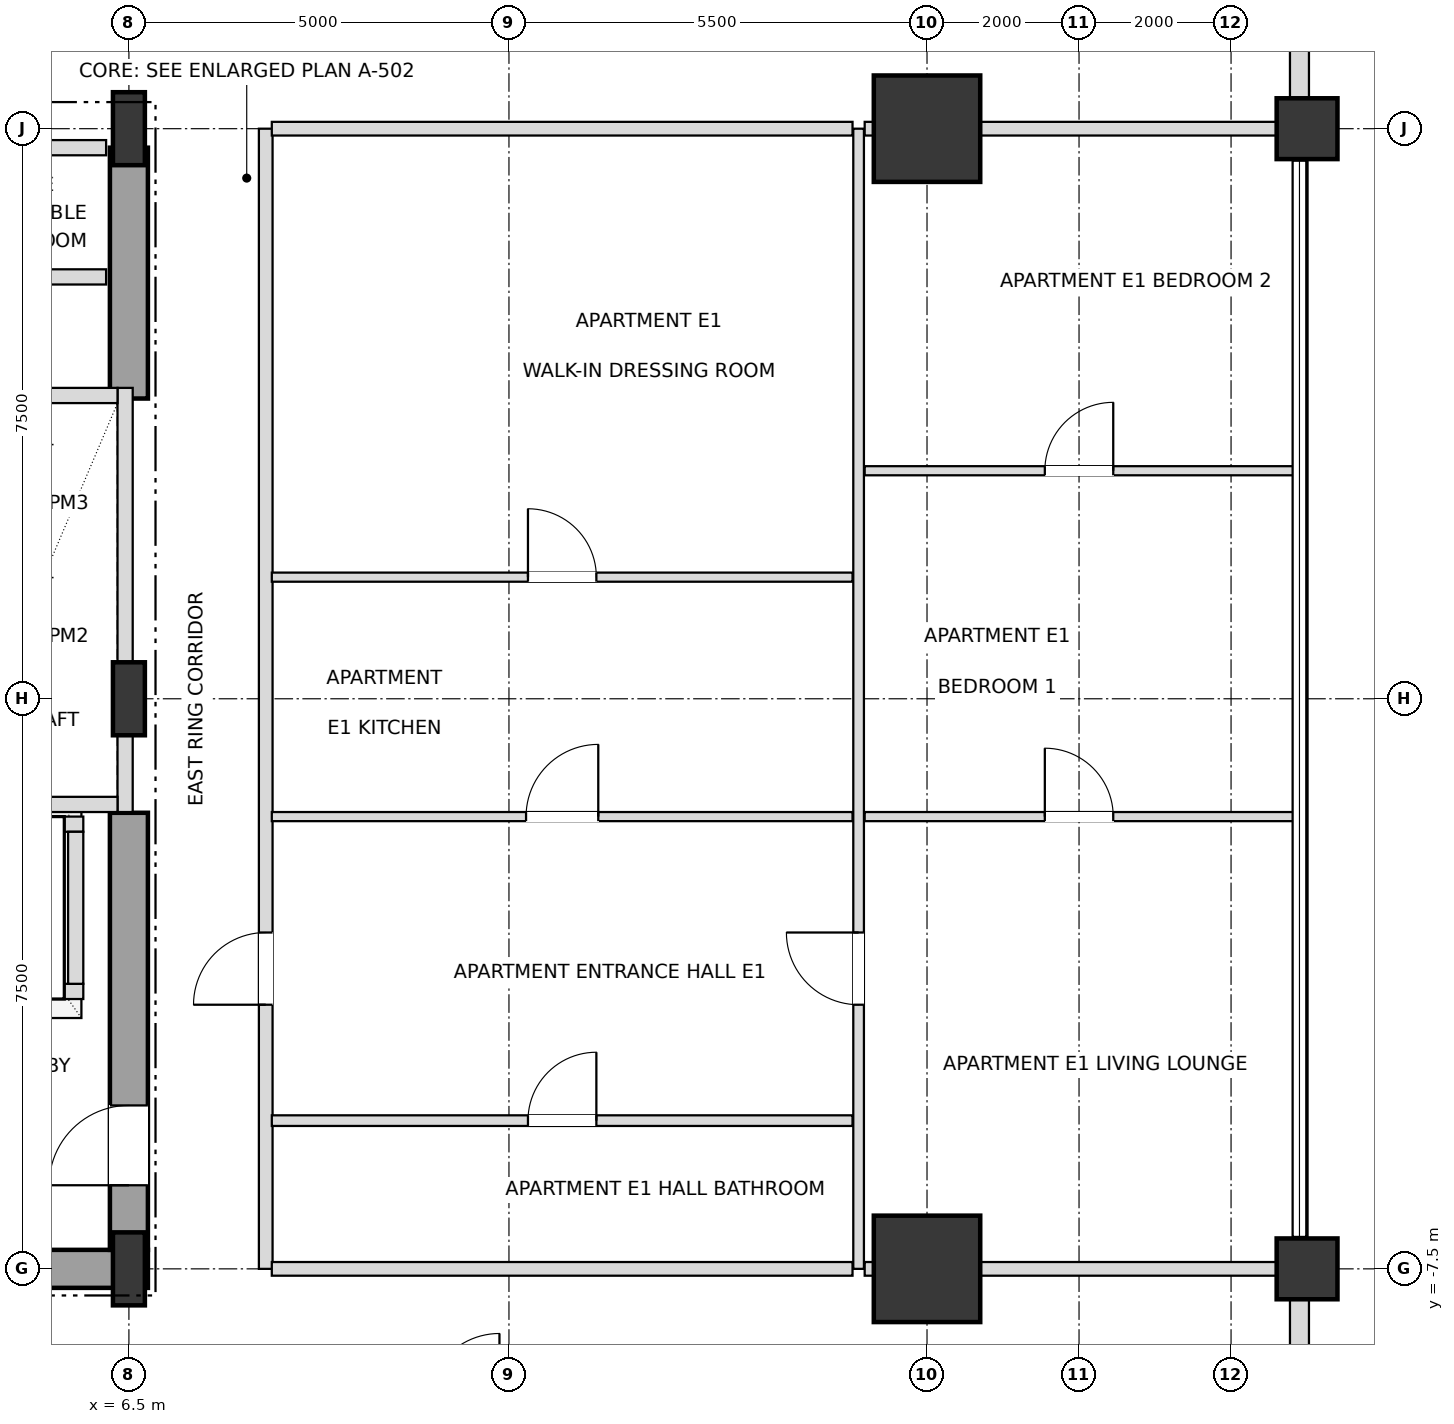
"""IFC4 building model, lengths in metres.
Left out: names, types, materials, properties, quantities, classifications, styles, units other than length and angle.
Written with IfcOpenShell. Run it as: python <this file> out.ifc"""

import sys

from ifc_helpers import new_model, si_unit, direction, frame, frame_2d, origin, origin_2d, place, context, subcontext, project, spatial, rectangle, i_section, extrude, element, fill, save


model = new_model("IFC4")
c1 = context("Model", 3, precision=1e-05, world=origin(), true_north=direction((0.0, 1.0)))
c2 = subcontext(c1, "Body", "Model", "MODEL_VIEW")
j1 = project(units=[si_unit("LENGTHUNIT", "METRE"), si_unit("PLANEANGLEUNIT", "RADIAN")], contexts=[c1])
p1 = place(None, origin())
s1 = spatial("IfcSite", under=j1, at=p1, CompositionType="ELEMENT")
p2 = place(p1, origin())
s2 = spatial("IfcBuilding", under=s1, at=p2, CompositionType="ELEMENT")
p3 = place(p2, frame((0.0, 0.0, 57.6)))
s3 = spatial("IfcBuildingStorey", under=s2, at=p3, CompositionType="ELEMENT", Elevation=57.6)
for number, where, z_axis, x_axis in (
    (1, (6.5, -7.5, 0.0), (0.0, 0.0, 1.0), (1.0, 0.0, 0.0)),
    (2, (6.5, 0.0, 0.0), (0.0, 0.0, 1.0), (1.0, 0.0, 0.0)),
    (3, (6.5, 7.5, 0.0), (0.0, 0.0, 1.0), (1.0, 0.0, 0.0)),
):
    element("IfcColumn", number, at=place(p3, frame(where, z_axis=z_axis, x_axis=x_axis)), inside=s3, PredefinedType="COLUMN", context=c2, shape_type="SweptSolid", body=[
        extrude(i_section(OverallWidth=0.42, OverallDepth=0.96, WebThickness=0.022, FlangeThickness=0.034, at=origin_2d()), origin(), (0.0, 0.0, 1.0), 3.6),
    ])
for number, where, z_axis, x_axis in (
    (4, (17.0, -7.5, 0.0), (0.0, 0.0, 1.0), (1.0, 0.0, 0.0)),
    (5, (17.0, 7.5, 0.0), (0.0, 0.0, 1.0), (1.0, 0.0, 0.0)),
):
    element("IfcColumn", number, at=place(p3, frame(where, z_axis=z_axis, x_axis=x_axis)), inside=s3, PredefinedType="USERDEFINED", context=c2, shape_type="SweptSolid", body=[
        extrude(rectangle(XDim=1.4, YDim=1.4, at=origin_2d()), origin(), (0.0, 0.0, 1.0), 3.6),
    ])
for number, where, z_axis, x_axis in (
    (6, (22.0, -7.5, 0.0), (0.0, 0.0, 1.0), (1.0, 0.0, 0.0)),
    (7, (22.0, 7.5, 0.0), (0.0, 0.0, 1.0), (1.0, 0.0, 0.0)),
):
    element("IfcColumn", number, at=place(p3, frame(where, z_axis=z_axis, x_axis=x_axis)), inside=s3, PredefinedType="COLUMN", context=c2, shape_type="SweptSolid", body=[
        extrude(rectangle(XDim=0.8, YDim=0.8, at=origin_2d()), origin(), (0.0, 0.0, 1.0), 3.6),
    ])
p4 = place(p3, frame((21.9, -12.605, 0.0), z_axis=(0.0, 0.0, 1.0), x_axis=(0.0, 1.0, 0.0)))
e8 = element("IfcWall", 8, at=p4, inside=s3, PredefinedType="SOLIDWALL", context=c2, shape_type="SweptSolid", body=[
    extrude(rectangle(XDim=4.71, YDim=0.25, at=frame_2d((2.355, 0.0))), origin(), (0.0, 0.0, 1.0), 2.736),
])
p5 = place(p4, frame((1.455, 0.0, 0.72)))
e9 = element("IfcOpeningElement", 9, at=p5, cuts=e8, PredefinedType="OPENING", context=c2, shape_type="SweptSolid", body=[
    extrude(rectangle(XDim=1.8, YDim=1.68, at=frame_2d((0.9, 0.84))), frame((0.0, 0.135, 0.0), z_axis=(0.0, -1.0, 0.0), x_axis=(1.0, 0.0, 0.0)), (0.0, 0.0, 1.0), 0.27),
])
p6 = place(p3, frame((21.9, 7.895, 0.0), z_axis=(0.0, 0.0, 1.0), x_axis=(0.0, 1.0, 0.0)))
e10 = element("IfcWall", 10, at=p6, inside=s3, PredefinedType="SOLIDWALL", context=c2, shape_type="SweptSolid", body=[
    extrude(rectangle(XDim=4.71, YDim=0.25, at=frame_2d((2.355, 0.0))), origin(), (0.0, 0.0, 1.0), 2.736),
])
p7 = place(p6, frame((1.455, 0.0, 0.72)))
e11 = element("IfcOpeningElement", 11, at=p7, cuts=e10, PredefinedType="OPENING", context=c2, shape_type="SweptSolid", body=[
    extrude(rectangle(XDim=1.8, YDim=1.68, at=frame_2d((0.9, 0.84))), frame((0.0, 0.135, 0.0), z_axis=(0.0, -1.0, 0.0), x_axis=(1.0, 0.0, 0.0)), (0.0, 0.0, 1.0), 0.27),
])
p8 = place(p3, frame((0.0, -7.5, 0.0), z_axis=(0.0, 0.0, 1.0), x_axis=(1.0, 0.0, 0.0)))
e12 = element("IfcWall", 12, at=p8, inside=s3, PredefinedType="SHEAR", context=c2, shape_type="SweptSolid", body=[
    extrude(rectangle(XDim=6.75, YDim=0.5, at=frame_2d((3.375, 0.0))), origin(), (0.0, 0.0, 1.0), 3.38),
])
p9 = place(p3, frame((6.5, -7.25, 0.0), z_axis=(0.0, 0.0, 1.0), x_axis=(0.0, 1.0, 0.0)))
e13 = element("IfcWall", 13, at=p9, inside=s3, PredefinedType="SHEAR", context=c2, shape_type="SweptSolid", body=[
    extrude(rectangle(XDim=5.75, YDim=0.5, at=frame_2d((2.875, 0.0))), origin(), (0.0, 0.0, 1.0), 3.38),
])
p10 = place(p9, frame((0.85, 0.0, 0.0)))
e14 = element("IfcOpeningElement", 14, at=p10, cuts=e13, PredefinedType="OPENING", context=c2, shape_type="SweptSolid", body=[
    extrude(rectangle(XDim=1.05, YDim=2.15, at=frame_2d((0.525, 1.075))), frame((0.0, 0.26, 0.0), z_axis=(0.0, -1.0, 0.0), x_axis=(1.0, 0.0, 0.0)), (0.0, 0.0, 1.0), 0.52),
])
p11 = place(p3, frame((6.5, 3.95, 0.0), z_axis=(0.0, 0.0, 1.0), x_axis=(0.0, 1.0, 0.0)))
e15 = element("IfcWall", 15, at=p11, inside=s3, PredefinedType="SHEAR", context=c2, shape_type="SweptSolid", body=[
    extrude(rectangle(XDim=3.3, YDim=0.5, at=frame_2d((1.65, 0.0))), origin(), (0.0, 0.0, 1.0), 3.38),
])
p12 = place(p3, frame((6.45, -1.49, 0.0), z_axis=(0.0, 0.0, 1.0), x_axis=(0.0, 1.0, 0.0)))
e16 = element("IfcWall", 16, at=p12, inside=s3, PredefinedType="SOLIDWALL", context=c2, shape_type="SweptSolid", body=[
    extrude(rectangle(XDim=5.58, YDim=0.2, at=frame_2d((2.79, 0.0))), origin(), (0.0, 0.0, 1.0), 2.816),
])
for number, where, z_axis, x_axis in (
    (17, (4.15, -1.39, 0.0), (0.0, 0.0, 1.0), (1.0, 0.0, 0.0)),
    (18, (4.15, 3.99, 0.0), (0.0, 0.0, 1.0), (1.0, 0.0, 0.0)),
):
    element("IfcWall", number, at=place(p3, frame(where, z_axis=z_axis, x_axis=x_axis)), inside=s3, PredefinedType="SOLIDWALL", context=c2, shape_type="SweptSolid", body=[
        extrude(rectangle(XDim=2.2, YDim=0.2, at=frame_2d((1.1, 0.0))), origin(), (0.0, 0.0, 1.0), 3.38),
    ])
p13 = place(p3, frame((1.8, -3.85, 0.0), z_axis=(0.0, 0.0, 1.0), x_axis=(1.0, 0.0, 0.0)))
e19 = element("IfcWall", 19, at=p13, inside=s3, PredefinedType="SOLIDWALL", context=c2, shape_type="SweptSolid", body=[
    extrude(rectangle(XDim=4.1, YDim=0.2, at=frame_2d((2.05, 0.0))), origin(), (0.0, 0.0, 1.0), 3.38),
])
p14 = place(p13, frame((0.45, 0.0, 0.0)))
e20 = element("IfcOpeningElement", 20, at=p14, cuts=e19, PredefinedType="OPENING", context=c2, shape_type="SweptSolid", body=[
    extrude(rectangle(XDim=1.2, YDim=2.2, at=frame_2d((0.6, 1.1))), frame((0.0, 0.11, 0.0), z_axis=(0.0, -1.0, 0.0), x_axis=(1.0, 0.0, 0.0)), (0.0, 0.0, 1.0), 0.22),
])
p15 = place(p13, frame((2.45, 0.0, 0.0)))
e21 = element("IfcOpeningElement", 21, at=p15, cuts=e19, PredefinedType="OPENING", context=c2, shape_type="SweptSolid", body=[
    extrude(rectangle(XDim=1.2, YDim=2.2, at=frame_2d((0.6, 1.1))), frame((0.0, 0.11, 0.0), z_axis=(0.0, -1.0, 0.0), x_axis=(1.0, 0.0, 0.0)), (0.0, 0.0, 1.0), 0.22),
])
p16 = place(p3, frame((1.8, -1.65, 0.0), z_axis=(0.0, 0.0, 1.0), x_axis=(1.0, 0.0, 0.0)))
e22 = element("IfcWall", 22, at=p16, inside=s3, PredefinedType="SOLIDWALL", context=c2, shape_type="SweptSolid", body=[
    extrude(rectangle(XDim=4.1, YDim=0.2, at=frame_2d((2.05, 0.0))), origin(), (0.0, 0.0, 1.0), 3.38),
])
p17 = place(p3, frame((5.8, -3.75, 0.0), z_axis=(0.0, 0.0, 1.0), x_axis=(0.0, 1.0, 0.0)))
e23 = element("IfcWall", 23, at=p17, inside=s3, PredefinedType="SOLIDWALL", context=c2, shape_type="SweptSolid", body=[
    extrude(rectangle(XDim=2.0, YDim=0.2, at=frame_2d((1.0, 0.0))), origin(), (0.0, 0.0, 1.0), 3.38),
])
p18 = place(p3, frame((8.3, -7.5, 0.0), z_axis=(0.0, 0.0, 1.0), x_axis=(0.0, 1.0, 0.0)))
e24 = element("IfcWall", 24, at=p18, inside=s3, PredefinedType="PARTITIONING", context=c2, shape_type="SweptSolid", body=[
    extrude(rectangle(XDim=15.0, YDim=0.18, at=frame_2d((7.5, 0.0))), origin(), (0.0, 0.0, 1.0), 3.38),
])
p19 = place(p18, frame((3.475, 0.0, 0.0)))
e25 = element("IfcOpeningElement", 25, at=p19, cuts=e24, PredefinedType="OPENING", context=c2, shape_type="SweptSolid", body=[
    extrude(rectangle(XDim=0.95, YDim=2.15, at=frame_2d((0.475, 1.075))), frame((0.0, 0.1, 0.0), z_axis=(0.0, -1.0, 0.0), x_axis=(1.0, 0.0, 0.0)), (0.0, 0.0, 1.0), 0.2),
])
p20 = place(p3, frame((16.1, -7.5, 0.0), z_axis=(0.0, 0.0, 1.0), x_axis=(0.0, 1.0, 0.0)))
e26 = element("IfcWall", 26, at=p20, inside=s3, PredefinedType="PARTITIONING", context=c2, shape_type="SweptSolid", body=[
    extrude(rectangle(XDim=15.0, YDim=0.14, at=frame_2d((7.5, 0.0))), origin(), (0.0, 0.0, 1.0), 3.38),
])
p21 = place(p20, frame((3.475, 0.0, 0.0)))
e27 = element("IfcOpeningElement", 27, at=p21, cuts=e26, PredefinedType="OPENING", context=c2, shape_type="SweptSolid", body=[
    extrude(rectangle(XDim=0.95, YDim=2.1, at=frame_2d((0.475, 1.05))), frame((0.0, 0.08, 0.0), z_axis=(0.0, -1.0, 0.0), x_axis=(1.0, 0.0, 0.0)), (0.0, 0.0, 1.0), 0.16),
])
p22 = place(p3, frame((8.38, -7.5, 0.0), z_axis=(0.0, 0.0, 1.0), x_axis=(1.0, 0.0, 0.0)))
e28 = element("IfcWall", 28, at=p22, inside=s3, PredefinedType="PARTITIONING", context=c2, shape_type="SweptSolid", body=[
    extrude(rectangle(XDim=7.64, YDim=0.18, at=frame_2d((3.82, 0.0))), origin(), (0.0, 0.0, 1.0), 2.816),
])
p23 = place(p3, frame((16.18, -7.5, 0.0), z_axis=(0.0, 0.0, 1.0), x_axis=(1.0, 0.0, 0.0)))
e29 = element("IfcWall", 29, at=p23, inside=s3, PredefinedType="PARTITIONING", context=c2, shape_type="SweptSolid", body=[
    extrude(rectangle(XDim=5.72, YDim=0.18, at=frame_2d((2.86, 0.0))), origin(), (0.0, 0.0, 1.0), 2.816),
])
p24 = place(p3, frame((8.38, -5.55, 0.0), z_axis=(0.0, 0.0, 1.0), x_axis=(1.0, 0.0, 0.0)))
e30 = element("IfcWall", 30, at=p24, inside=s3, PredefinedType="PARTITIONING", context=c2, shape_type="SweptSolid", body=[
    extrude(rectangle(XDim=7.64, YDim=0.14, at=frame_2d((3.82, 0.0))), origin(), (0.0, 0.0, 1.0), 2.948),
])
p25 = place(p24, frame((3.37, 0.0, 0.0)))
e31 = element("IfcOpeningElement", 31, at=p25, cuts=e30, PredefinedType="OPENING", context=c2, shape_type="SweptSolid", body=[
    extrude(rectangle(XDim=0.9, YDim=2.1, at=frame_2d((0.45, 1.05))), frame((0.0, 0.08, 0.0), z_axis=(0.0, -1.0, 0.0), x_axis=(1.0, 0.0, 0.0)), (0.0, 0.0, 1.0), 0.16),
])
p26 = place(p3, frame((8.38, -1.55, 0.0), z_axis=(0.0, 0.0, 1.0), x_axis=(1.0, 0.0, 0.0)))
e32 = element("IfcWall", 32, at=p26, inside=s3, PredefinedType="PARTITIONING", context=c2, shape_type="SweptSolid", body=[
    extrude(rectangle(XDim=7.64, YDim=0.12, at=frame_2d((3.82, 0.0))), origin(), (0.0, 0.0, 1.0), 2.948),
])
p27 = place(p26, frame((3.345, 0.0, 0.0)))
e33 = element("IfcOpeningElement", 33, at=p27, cuts=e32, PredefinedType="OPENING", context=c2, shape_type="SweptSolid", body=[
    extrude(rectangle(XDim=0.95, YDim=2.1, at=frame_2d((0.475, 1.05))), frame((0.0, 0.07, 0.0), z_axis=(0.0, -1.0, 0.0), x_axis=(1.0, 0.0, 0.0)), (0.0, 0.0, 1.0), 0.14),
])
p28 = place(p3, frame((16.18, -1.55, 0.0), z_axis=(0.0, 0.0, 1.0), x_axis=(1.0, 0.0, 0.0)))
e34 = element("IfcWall", 34, at=p28, inside=s3, PredefinedType="PARTITIONING", context=c2, shape_type="SweptSolid", body=[
    extrude(rectangle(XDim=5.64, YDim=0.12, at=frame_2d((2.82, 0.0))), origin(), (0.0, 0.0, 1.0), 2.816),
])
p29 = place(p28, frame((2.37, 0.0, 0.0)))
e35 = element("IfcOpeningElement", 35, at=p29, cuts=e34, PredefinedType="OPENING", context=c2, shape_type="SweptSolid", body=[
    extrude(rectangle(XDim=0.9, YDim=2.1, at=frame_2d((0.45, 1.05))), frame((0.0, 0.07, 0.0), z_axis=(0.0, -1.0, 0.0), x_axis=(1.0, 0.0, 0.0)), (0.0, 0.0, 1.0), 0.14),
])
p30 = place(p3, frame((8.38, 1.6, 0.0), z_axis=(0.0, 0.0, 1.0), x_axis=(1.0, 0.0, 0.0)))
e36 = element("IfcWall", 36, at=p30, inside=s3, PredefinedType="PARTITIONING", context=c2, shape_type="SweptSolid", body=[
    extrude(rectangle(XDim=7.64, YDim=0.12, at=frame_2d((3.82, 0.0))), origin(), (0.0, 0.0, 1.0), 2.948),
])
p31 = place(p30, frame((3.37, 0.0, 0.0)))
e37 = element("IfcOpeningElement", 37, at=p31, cuts=e36, PredefinedType="OPENING", context=c2, shape_type="SweptSolid", body=[
    extrude(rectangle(XDim=0.9, YDim=2.1, at=frame_2d((0.45, 1.05))), frame((0.0, 0.07, 0.0), z_axis=(0.0, -1.0, 0.0), x_axis=(1.0, 0.0, 0.0)), (0.0, 0.0, 1.0), 0.14),
])
p32 = place(p3, frame((16.18, 3.0, 0.0), z_axis=(0.0, 0.0, 1.0), x_axis=(1.0, 0.0, 0.0)))
e38 = element("IfcWall", 38, at=p32, inside=s3, PredefinedType="PARTITIONING", context=c2, shape_type="SweptSolid", body=[
    extrude(rectangle(XDim=5.64, YDim=0.12, at=frame_2d((2.82, 0.0))), origin(), (0.0, 0.0, 1.0), 2.816),
])
p33 = place(p32, frame((2.37, 0.0, 0.0)))
e39 = element("IfcOpeningElement", 39, at=p33, cuts=e38, PredefinedType="OPENING", context=c2, shape_type="SweptSolid", body=[
    extrude(rectangle(XDim=0.9, YDim=2.1, at=frame_2d((0.45, 1.05))), frame((0.0, 0.07, 0.0), z_axis=(0.0, -1.0, 0.0), x_axis=(1.0, 0.0, 0.0)), (0.0, 0.0, 1.0), 0.14),
])
for number, where, z_axis, x_axis in (
    (40, (4.13, 5.55, 0.0), (0.0, 0.0, 1.0), (1.0, 0.0, 0.0)),
    (41, (4.13, 7.25, 0.0), (0.0, 0.0, 1.0), (1.0, 0.0, 0.0)),
):
    element("IfcWall", number, at=place(p3, frame(where, z_axis=z_axis, x_axis=x_axis)), inside=s3, PredefinedType="SOLIDWALL", context=c2, shape_type="SweptSolid", body=[
        extrude(rectangle(XDim=2.07, YDim=0.2, at=frame_2d((1.035, 0.0))), origin(), (0.0, 0.0, 1.0), 3.38),
    ])
p34 = place(p3, frame((8.38, 7.5, 0.0), z_axis=(0.0, 0.0, 1.0), x_axis=(1.0, 0.0, 0.0)))
e42 = element("IfcWall", 42, at=p34, inside=s3, PredefinedType="PARTITIONING", context=c2, shape_type="SweptSolid", body=[
    extrude(rectangle(XDim=7.64, YDim=0.18, at=frame_2d((3.82, 0.0))), origin(), (0.0, 0.0, 1.0), 2.816),
])
p35 = place(p3, frame((16.18, 7.5, 0.0), z_axis=(0.0, 0.0, 1.0), x_axis=(1.0, 0.0, 0.0)))
e43 = element("IfcWall", 43, at=p35, inside=s3, PredefinedType="PARTITIONING", context=c2, shape_type="SweptSolid", body=[
    extrude(rectangle(XDim=5.72, YDim=0.18, at=frame_2d((2.86, 0.0))), origin(), (0.0, 0.0, 1.0), 2.816),
])
p36 = place(p10, origin())
e44 = element("IfcDoor", 44, at=p36, inside=s3, OperationType="SINGLE_SWING_LEFT", PredefinedType="DOOR", context=c2, shape_type="SweptSolid", body=[
    extrude(rectangle(XDim=1.05, YDim=2.15, at=frame_2d((0.525, 1.075))), frame((0.0, 0.025, 0.0), z_axis=(0.0, -1.0, 0.0), x_axis=(1.0, 0.0, 0.0)), (0.0, 0.0, 1.0), 0.05),
])
fill(e14, e44)
p37 = place(p25, origin())
e45 = element("IfcDoor", 45, at=p37, inside=s3, OperationType="SINGLE_SWING_RIGHT", PredefinedType="DOOR", context=c2, shape_type="SweptSolid", body=[
    extrude(rectangle(XDim=0.9, YDim=2.1, at=frame_2d((0.45, 1.05))), frame((0.0, 0.025, 0.0), z_axis=(0.0, -1.0, 0.0), x_axis=(1.0, 0.0, 0.0)), (0.0, 0.0, 1.0), 0.05),
])
fill(e31, e45)
p38 = place(p19, origin())
e46 = element("IfcDoor", 46, at=p38, inside=s3, OperationType="SINGLE_SWING_LEFT", PredefinedType="DOOR", context=c2, shape_type="SweptSolid", body=[
    extrude(rectangle(XDim=0.95, YDim=2.15, at=frame_2d((0.475, 1.075))), frame((0.0, 0.025, 0.0), z_axis=(0.0, -1.0, 0.0), x_axis=(1.0, 0.0, 0.0)), (0.0, 0.0, 1.0), 0.05),
])
fill(e25, e46)
p39 = place(p27, origin())
e47 = element("IfcDoor", 47, at=p39, inside=s3, OperationType="SINGLE_SWING_RIGHT", PredefinedType="DOOR", context=c2, shape_type="SweptSolid", body=[
    extrude(rectangle(XDim=0.95, YDim=2.1, at=frame_2d((0.475, 1.05))), frame((0.0, 0.025, 0.0), z_axis=(0.0, -1.0, 0.0), x_axis=(1.0, 0.0, 0.0)), (0.0, 0.0, 1.0), 0.05),
])
fill(e33, e47)
p40 = place(p31, origin())
e48 = element("IfcDoor", 48, at=p40, inside=s3, OperationType="SINGLE_SWING_LEFT", PredefinedType="DOOR", context=c2, shape_type="SweptSolid", body=[
    extrude(rectangle(XDim=0.9, YDim=2.1, at=frame_2d((0.45, 1.05))), frame((0.0, 0.025, 0.0), z_axis=(0.0, -1.0, 0.0), x_axis=(1.0, 0.0, 0.0)), (0.0, 0.0, 1.0), 0.05),
])
fill(e37, e48)
p41 = place(p21, origin())
e49 = element("IfcDoor", 49, at=p41, inside=s3, OperationType="SINGLE_SWING_RIGHT", PredefinedType="DOOR", context=c2, shape_type="SweptSolid", body=[
    extrude(rectangle(XDim=0.95, YDim=2.1, at=frame_2d((0.475, 1.05))), frame((0.0, 0.025, 0.0), z_axis=(0.0, -1.0, 0.0), x_axis=(1.0, 0.0, 0.0)), (0.0, 0.0, 1.0), 0.05),
])
fill(e27, e49)
p42 = place(p29, origin())
e50 = element("IfcDoor", 50, at=p42, inside=s3, OperationType="SINGLE_SWING_LEFT", PredefinedType="DOOR", context=c2, shape_type="SweptSolid", body=[
    extrude(rectangle(XDim=0.9, YDim=2.1, at=frame_2d((0.45, 1.05))), frame((0.0, 0.025, 0.0), z_axis=(0.0, -1.0, 0.0), x_axis=(1.0, 0.0, 0.0)), (0.0, 0.0, 1.0), 0.05),
])
fill(e35, e50)
p43 = place(p33, origin())
e51 = element("IfcDoor", 51, at=p43, inside=s3, OperationType="SINGLE_SWING_RIGHT", PredefinedType="DOOR", context=c2, shape_type="SweptSolid", body=[
    extrude(rectangle(XDim=0.9, YDim=2.1, at=frame_2d((0.45, 1.05))), frame((0.0, 0.025, 0.0), z_axis=(0.0, -1.0, 0.0), x_axis=(1.0, 0.0, 0.0)), (0.0, 0.0, 1.0), 0.05),
])
fill(e39, e51)
save(model, sys.argv[1])
